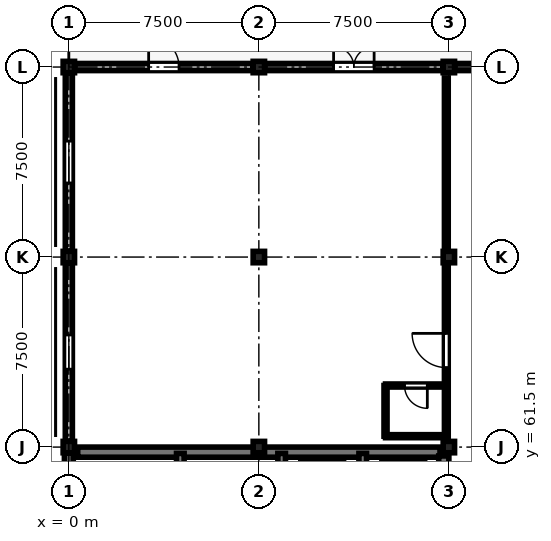
"""IFC4 building model, lengths in metres.
Left out: names, types, materials, properties, quantities, classifications, styles, units other than length and angle.
Written with IfcOpenShell. Run it as: python <this file> out.ifc"""

import sys

from ifc_helpers import new_model, si_unit, direction, frame, frame_2d, origin, origin_2d, place, context, subcontext, project, spatial, rectangle, extrude, element, fill, save


model = new_model("IFC4")
c1 = context("Model", 3, precision=1e-05, world=origin(), true_north=direction((0.0, 1.0)))
c2 = subcontext(c1, "Body", "Model", "MODEL_VIEW")
j1 = project(units=[si_unit("LENGTHUNIT", "METRE"), si_unit("PLANEANGLEUNIT", "RADIAN")], contexts=[c1])
p1 = place(None, origin())
s1 = spatial("IfcSite", under=j1, at=p1, CompositionType="ELEMENT")
p2 = place(p1, origin())
s2 = spatial("IfcBuilding", under=s1, at=p2, CompositionType="ELEMENT")
p3 = place(p2, frame((0.0, 0.0, 30.0)))
s3 = spatial("IfcBuildingStorey", under=s2, at=p3, CompositionType="ELEMENT", Elevation=30.0)
for number, where, z_axis, x_axis in (
    (1, (0.0, 61.5, 0.0), (0.0, 0.0, 1.0), (1.0, 0.0, 0.0)),
    (2, (0.0, 69.0, 0.0), (0.0, 0.0, 1.0), (1.0, 0.0, 0.0)),
    (3, (0.0, 76.5, 0.0), (0.0, 0.0, 1.0), (1.0, 0.0, 0.0)),
    (4, (7.5, 61.5, 0.0), (0.0, 0.0, 1.0), (1.0, 0.0, 0.0)),
    (5, (7.5, 69.0, 0.0), (0.0, 0.0, 1.0), (1.0, 0.0, 0.0)),
    (6, (7.5, 76.5, 0.0), (0.0, 0.0, 1.0), (1.0, 0.0, 0.0)),
    (7, (15.0, 61.5, 0.0), (0.0, 0.0, 1.0), (1.0, 0.0, 0.0)),
    (8, (15.0, 69.0, 0.0), (0.0, 0.0, 1.0), (1.0, 0.0, 0.0)),
    (9, (15.0, 76.5, 0.0), (0.0, 0.0, 1.0), (1.0, 0.0, 0.0)),
):
    element("IfcColumn", number, at=place(p3, frame(where, z_axis=z_axis, x_axis=x_axis)), inside=s3, PredefinedType="COLUMN", context=c2, shape_type="SweptSolid", body=[
        extrude(rectangle(XDim=0.45, YDim=0.45, at=origin_2d()), origin(), (0.0, 0.0, 1.0), 4.05),
    ])
p4 = place(p3, frame((0.0, 54.235, 0.0), z_axis=(0.0, 0.0, 1.0), x_axis=(0.0, 1.0, 0.0)))
e10 = element("IfcWall", 10, at=p4, inside=s3, PredefinedType="SHEAR", context=c2, shape_type="SweptSolid", body=[
    extrude(rectangle(XDim=7.03, YDim=0.35, at=frame_2d((3.515, 0.0))), origin(), (0.0, 0.0, 1.0), 3.83),
])
p5 = place(p3, frame((0.0, 61.735, 0.0), z_axis=(0.0, 0.0, 1.0), x_axis=(0.0, 1.0, 0.0)))
e11 = element("IfcWall", 11, at=p5, inside=s3, PredefinedType="STANDARD", context=c2, shape_type="SweptSolid", body=[
    extrude(rectangle(XDim=7.03, YDim=0.28, at=frame_2d((3.515, 0.0))), origin(), (0.0, 0.0, 1.0), 3.83),
])
p6 = place(p5, frame((2.84, 0.0, 0.85)))
e12 = element("IfcOpeningElement", 12, at=p6, cuts=e11, PredefinedType="OPENING", context=c2, shape_type="SweptSolid", body=[
    extrude(rectangle(XDim=1.35, YDim=2.25, at=frame_2d((0.675, 1.125))), frame((0.0, 0.15, 0.0), z_axis=(0.0, -1.0, 0.0), x_axis=(1.0, 0.0, 0.0)), (0.0, 0.0, 1.0), 0.3),
])
p7 = place(p3, frame((0.235, 76.5, 0.0), z_axis=(0.0, 0.0, 1.0), x_axis=(1.0, 0.0, 0.0)))
e13 = element("IfcWall", 13, at=p7, inside=s3, PredefinedType="STANDARD", context=c2, shape_type="SweptSolid", body=[
    extrude(rectangle(XDim=7.03, YDim=0.28, at=frame_2d((3.515, 0.0))), origin(), (0.0, 0.0, 1.0), 3.83),
])
p8 = place(p7, frame((2.915, 0.0, 0.0)))
e14 = element("IfcOpeningElement", 14, at=p8, cuts=e13, PredefinedType="OPENING", context=c2, shape_type="SweptSolid", body=[
    extrude(rectangle(XDim=1.2, YDim=2.3, at=frame_2d((0.6, 1.15))), frame((0.0, 0.15, 0.0), z_axis=(0.0, -1.0, 0.0), x_axis=(1.0, 0.0, 0.0)), (0.0, 0.0, 1.0), 0.3),
])
p9 = place(p3, frame((0.0, 69.235, 0.0), z_axis=(0.0, 0.0, 1.0), x_axis=(0.0, 1.0, 0.0)))
e15 = element("IfcWall", 15, at=p9, inside=s3, PredefinedType="STANDARD", context=c2, shape_type="SweptSolid", body=[
    extrude(rectangle(XDim=7.03, YDim=0.28, at=frame_2d((3.515, 0.0))), origin(), (0.0, 0.0, 1.0), 3.83),
])
p10 = place(p9, frame((2.69, 0.0, 0.85)))
e16 = element("IfcOpeningElement", 16, at=p10, cuts=e15, PredefinedType="OPENING", context=c2, shape_type="SweptSolid", body=[
    extrude(rectangle(XDim=1.65, YDim=2.25, at=frame_2d((0.825, 1.125))), frame((0.0, 0.15, 0.0), z_axis=(0.0, -1.0, 0.0), x_axis=(1.0, 0.0, 0.0)), (0.0, 0.0, 1.0), 0.3),
])
p11 = place(p3, frame((7.735, 76.5, 0.0), z_axis=(0.0, 0.0, 1.0), x_axis=(1.0, 0.0, 0.0)))
e17 = element("IfcWall", 17, at=p11, inside=s3, PredefinedType="STANDARD", context=c2, shape_type="SweptSolid", body=[
    extrude(rectangle(XDim=7.03, YDim=0.28, at=frame_2d((3.515, 0.0))), origin(), (0.0, 0.0, 1.0), 3.83),
])
p12 = place(p11, frame((2.715, 0.0, 0.0)))
e18 = element("IfcOpeningElement", 18, at=p12, cuts=e17, PredefinedType="OPENING", context=c2, shape_type="SweptSolid", body=[
    extrude(rectangle(XDim=1.6, YDim=2.35, at=frame_2d((0.8, 1.175))), frame((0.0, 0.15, 0.0), z_axis=(0.0, -1.0, 0.0), x_axis=(1.0, 0.0, 0.0)), (0.0, 0.0, 1.0), 0.3),
])
p13 = place(p3, frame((15.235, 76.5, 0.0), z_axis=(0.0, 0.0, 1.0), x_axis=(1.0, 0.0, 0.0)))
e19 = element("IfcWall", 19, at=p13, inside=s3, PredefinedType="STANDARD", context=c2, shape_type="SweptSolid", body=[
    extrude(rectangle(XDim=7.03, YDim=0.28, at=frame_2d((3.515, 0.0))), origin(), (0.0, 0.0, 1.0), 3.83),
])
p14 = place(p13, frame((2.915, 0.0, 0.0)))
e20 = element("IfcOpeningElement", 20, at=p14, cuts=e19, PredefinedType="OPENING", context=c2, shape_type="SweptSolid", body=[
    extrude(rectangle(XDim=1.2, YDim=2.3, at=frame_2d((0.6, 1.15))), frame((0.0, 0.15, 0.0), z_axis=(0.0, -1.0, 0.0), x_axis=(1.0, 0.0, 0.0)), (0.0, 0.0, 1.0), 0.3),
])
p15 = place(p3, frame((0.35, 61.3, 0.0), z_axis=(0.0, 0.0, 1.0), x_axis=(1.0, 0.0, 0.0)))
e21 = element("IfcWall", 21, at=p15, inside=s3, PredefinedType="SHEAR", context=c2, shape_type="SweptSolid", body=[
    extrude(rectangle(XDim=14.3, YDim=0.4, at=frame_2d((7.15, 0.0))), origin(), (0.0, 0.0, 1.0), 3.83),
])
p16 = place(p3, frame((14.8, 58.1, 0.0), z_axis=(0.0, 0.0, 1.0), x_axis=(0.0, 1.0, 0.0)))
e22 = element("IfcWall", 22, at=p16, inside=s3, PredefinedType="SHEAR", context=c2, shape_type="SweptSolid", body=[
    extrude(rectangle(XDim=3.05, YDim=0.4, at=frame_2d((1.525, 0.0))), origin(), (0.0, 0.0, 1.0), 3.83),
])
for number, where, z_axis, x_axis in (
    (23, (4.4, 58.1, 0.0), (0.0, 0.0, 1.0), (0.0, 1.0, 0.0)),
    (24, (8.4, 58.1, 0.0), (0.0, 0.0, 1.0), (0.0, 1.0, 0.0)),
    (25, (11.6, 58.1, 0.0), (0.0, 0.0, 1.0), (0.0, 1.0, 0.0)),
):
    element("IfcWall", number, at=place(p3, frame(where, z_axis=z_axis, x_axis=x_axis)), inside=s3, PredefinedType="SHEAR", context=c2, shape_type="SweptSolid", body=[
        extrude(rectangle(XDim=3.15, YDim=0.3, at=frame_2d((1.575, 0.0))), origin(), (0.0, 0.0, 1.0), 3.83),
    ])
p17 = place(p3, frame((14.9, 61.93, 0.0), z_axis=(0.0, 0.0, 1.0), x_axis=(0.0, 1.0, 0.0)))
e26 = element("IfcWall", 26, at=p17, inside=s3, PredefinedType="PARTITIONING", context=c2, shape_type="SweptSolid", body=[
    extrude(rectangle(XDim=14.14, YDim=0.15, at=frame_2d((7.07, 0.0))), origin(), (0.0, 0.0, 1.0), 3.815),
])
p18 = place(p17, frame((2.708, 0.0, 0.0)))
e27 = element("IfcOpeningElement", 27, at=p18, cuts=e26, PredefinedType="OPENING", context=c2, shape_type="SweptSolid", body=[
    extrude(rectangle(XDim=1.35, YDim=2.25, at=frame_2d((0.675, 1.125))), frame((0.0, 0.085, 0.0), z_axis=(0.0, -1.0, 0.0), x_axis=(1.0, 0.0, 0.0)), (0.0, 0.0, 1.0), 0.17),
])
p19 = place(p3, frame((14.9, 63.93, 0.0), z_axis=(0.0, 0.0, 1.0), x_axis=(-1.0, 0.0, 0.0)))
e28 = element("IfcWall", 28, at=p19, inside=s3, PredefinedType="PARTITIONING", context=c2, shape_type="SweptSolid", body=[
    extrude(rectangle(XDim=2.4, YDim=0.12, at=frame_2d((1.2, 0.0))), origin(), (0.0, 0.0, 1.0), 3.815),
])
p20 = place(p19, frame((0.75, 0.0, 0.0)))
e29 = element("IfcOpeningElement", 29, at=p20, cuts=e28, PredefinedType="OPENING", context=c2, shape_type="SweptSolid", body=[
    extrude(rectangle(XDim=0.9, YDim=2.1, at=frame_2d((0.45, 1.05))), frame((0.0, 0.07, 0.0), z_axis=(0.0, -1.0, 0.0), x_axis=(1.0, 0.0, 0.0)), (0.0, 0.0, 1.0), 0.14),
])
p21 = place(p3, frame((12.5, 61.93, 0.0), z_axis=(0.0, 0.0, 1.0), x_axis=(0.0, 1.0, 0.0)))
e30 = element("IfcWall", 30, at=p21, inside=s3, PredefinedType="PARTITIONING", context=c2, shape_type="SweptSolid", body=[
    extrude(rectangle(XDim=2.0, YDim=0.12, at=frame_2d((1.0, 0.0))), origin(), (0.0, 0.0, 1.0), 3.815),
])
p22 = place(p3, frame((12.5, 61.93, 0.0), z_axis=(0.0, 0.0, 1.0), x_axis=(1.0, 0.0, 0.0)))
e31 = element("IfcWall", 31, at=p22, inside=s3, PredefinedType="PARTITIONING", context=c2, shape_type="SweptSolid", body=[
    extrude(rectangle(XDim=2.4, YDim=0.12, at=frame_2d((1.2, 0.0))), origin(), (0.0, 0.0, 1.0), 3.815),
])
p23 = place(p6, origin())
e32 = element("IfcWindow", 32, at=p23, inside=s3, PartitioningType="SINGLE_PANEL", PredefinedType="WINDOW", context=c2, shape_type="SweptSolid", body=[
    extrude(rectangle(XDim=1.35, YDim=2.25, at=frame_2d((0.675, 1.125))), frame((0.0, 0.03, 0.0), z_axis=(0.0, -1.0, 0.0), x_axis=(1.0, 0.0, 0.0)), (0.0, 0.0, 1.0), 0.06),
])
fill(e12, e32)
p24 = place(p8, origin())
e33 = element("IfcDoor", 33, at=p24, inside=s3, OperationType="SINGLE_SWING_LEFT", PredefinedType="DOOR", context=c2, shape_type="SweptSolid", body=[
    extrude(rectangle(XDim=1.2, YDim=2.3, at=frame_2d((0.6, 1.15))), frame((0.0, 0.025, 0.0), z_axis=(0.0, -1.0, 0.0), x_axis=(1.0, 0.0, 0.0)), (0.0, 0.0, 1.0), 0.05),
])
fill(e14, e33)
p25 = place(p10, origin())
e34 = element("IfcWindow", 34, at=p25, inside=s3, PartitioningType="SINGLE_PANEL", PredefinedType="WINDOW", context=c2, shape_type="SweptSolid", body=[
    extrude(rectangle(XDim=1.65, YDim=2.25, at=frame_2d((0.825, 1.125))), frame((0.0, 0.03, 0.0), z_axis=(0.0, -1.0, 0.0), x_axis=(1.0, 0.0, 0.0)), (0.0, 0.0, 1.0), 0.06),
])
fill(e16, e34)
p26 = place(p12, origin())
e35 = element("IfcDoor", 35, at=p26, inside=s3, OperationType="DOUBLE_DOOR_SINGLE_SWING", PredefinedType="DOOR", context=c2, shape_type="SweptSolid", body=[
    extrude(rectangle(XDim=1.6, YDim=2.35, at=frame_2d((0.8, 1.175))), frame((0.0, 0.025, 0.0), z_axis=(0.0, -1.0, 0.0), x_axis=(1.0, 0.0, 0.0)), (0.0, 0.0, 1.0), 0.05),
])
fill(e18, e35)
p27 = place(p18, origin())
e36 = element("IfcDoor", 36, at=p27, inside=s3, OperationType="SINGLE_SWING_RIGHT", PredefinedType="DOOR", context=c2, shape_type="SweptSolid", body=[
    extrude(rectangle(XDim=1.35, YDim=2.25, at=frame_2d((0.675, 1.125))), frame((0.0, 0.025, 0.0), z_axis=(0.0, -1.0, 0.0), x_axis=(1.0, 0.0, 0.0)), (0.0, 0.0, 1.0), 0.05),
])
fill(e27, e36)
p28 = place(p20, origin())
e37 = element("IfcDoor", 37, at=p28, inside=s3, OperationType="SINGLE_SWING_LEFT", PredefinedType="DOOR", context=c2, shape_type="SweptSolid", body=[
    extrude(rectangle(XDim=0.9, YDim=2.1, at=frame_2d((0.45, 1.05))), frame((0.0, 0.025, 0.0), z_axis=(0.0, -1.0, 0.0), x_axis=(1.0, 0.0, 0.0)), (0.0, 0.0, 1.0), 0.05),
])
fill(e29, e37)
save(model, sys.argv[1])
